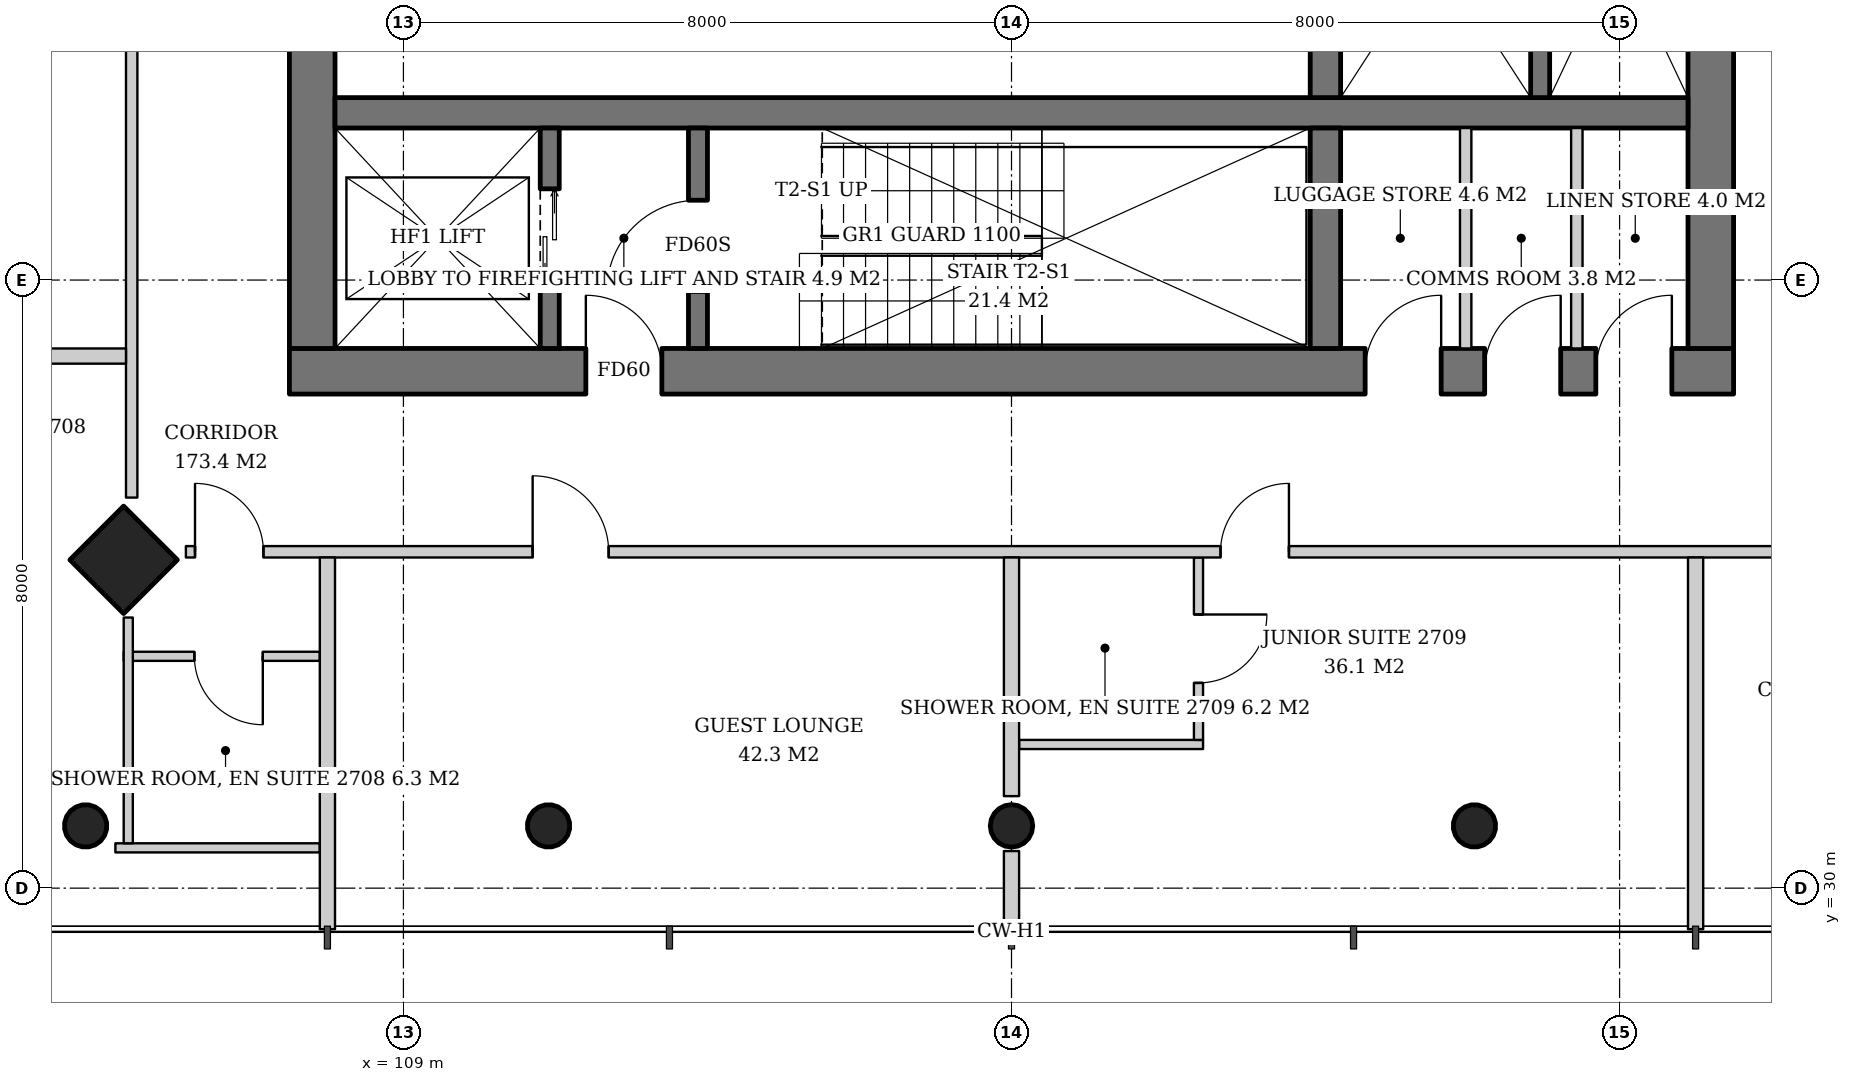
"""IFC4 building model, lengths in metres.
Left out: names, types, materials, properties, quantities, classifications, styles, units other than length and angle.
Written with IfcOpenShell. Run it as: python <this file> out.ifc"""

import sys

from ifc_helpers import new_model, si_unit, direction, frame, frame_2d, origin, origin_2d, place, context, subcontext, project, spatial, rectangle, hollow_circle, extrude, element, fill, save


model = new_model("IFC4")
c1 = context("Model", 3, precision=1e-05, world=origin(), true_north=direction((0.0, 1.0)))
c2 = subcontext(c1, "Body", "Model", "MODEL_VIEW")
j1 = project(units=[si_unit("LENGTHUNIT", "METRE"), si_unit("PLANEANGLEUNIT", "RADIAN")], contexts=[c1])
p1 = place(None, origin())
s1 = spatial("IfcSite", under=j1, at=p1, CompositionType="ELEMENT")
p2 = place(p1, origin())
s2 = spatial("IfcBuilding", under=s1, at=p2, CompositionType="ELEMENT")
p3 = place(p2, frame((0.0, 0.0, 108.4)))
s3 = spatial("IfcBuildingStorey", under=s2, at=p3, CompositionType="ELEMENT", Elevation=108.4)
p4 = place(p3, frame((105.267, 34.267, 0.0), z_axis=(0.043029647111, 0.043029647111, 0.998146732169), x_axis=(-0.707106781187, 0.707106781187, 0.0)))
e1 = element("IfcColumn", 1, at=p4, inside=s3, PredefinedType="COLUMN", context=c2, shape_type="SweptSolid", body=[
    extrude(rectangle(XDim=1.0, YDim=1.0, at=origin_2d()), origin(), (0.0, 0.0, 1.0), 3.807),
])
p5 = place(p3, frame((104.767, 30.767, 0.0), z_axis=(0.043029647111, 0.043029647111, 0.998146732169), x_axis=(-0.707106781187, 0.707106781187, 0.0)))
e2 = element("IfcColumn", 2, at=p5, inside=s3, PredefinedType="COLUMN", context=c2, shape_type="SweptSolid", body=[
    extrude(hollow_circle(Radius=0.28, WallThickness=0.02, at=origin_2d()), origin(), (0.0, 0.0, 1.0), 3.807),
])
p6 = place(p3, frame((110.884, 30.767, 0.0), z_axis=(0.021561848751, 0.043059525333, 0.998839808957), x_axis=(-0.894160516368, 0.44774654769, 0.0)))
e3 = element("IfcColumn", 3, at=p6, inside=s3, PredefinedType="COLUMN", context=c2, shape_type="SweptSolid", body=[
    extrude(hollow_circle(Radius=0.28, WallThickness=0.02, at=origin_2d()), origin(), (0.0, 0.0, 1.0), 3.804),
])
p7 = place(p3, frame((117.0, 30.767, 0.0), z_axis=(0.0, 0.043069538298, 0.999072076915), x_axis=(-1.0, 0.0, 0.0)))
e4 = element("IfcColumn", 4, at=p7, inside=s3, PredefinedType="COLUMN", context=c2, shape_type="SweptSolid", body=[
    extrude(hollow_circle(Radius=0.28, WallThickness=0.02, at=origin_2d()), origin(), (0.0, 0.0, 1.0), 3.803),
])
p8 = place(p3, frame((123.116, 30.767, 0.0), z_axis=(-0.021561848751, 0.043059525333, 0.998839808957), x_axis=(-0.894160516368, -0.44774654769, 0.0)))
e5 = element("IfcColumn", 5, at=p8, inside=s3, PredefinedType="COLUMN", context=c2, shape_type="SweptSolid", body=[
    extrude(hollow_circle(Radius=0.28, WallThickness=0.02, at=origin_2d()), origin(), (0.0, 0.0, 1.0), 3.804),
])
p9 = place(p3, frame((107.5, 36.8, 0.0), z_axis=(0.0, 0.0, 1.0), x_axis=(1.0, 0.0, 0.0)))
e6 = element("IfcWall", 6, at=p9, inside=s3, PredefinedType="SHEAR", context=c2, shape_type="SweptSolid", body=[
    extrude(rectangle(XDim=19.0, YDim=0.6, at=frame_2d((9.5, 0.0))), origin(), (0.0, 0.0, 1.0), 3.8),
])
p10 = place(p9, frame((3.9, 0.0, 0.0)))
e7 = element("IfcOpeningElement", 7, at=p10, cuts=e6, PredefinedType="OPENING", context=c2, shape_type="SweptSolid", body=[
    extrude(rectangle(XDim=1.0, YDim=2.1, at=frame_2d((0.5, 1.05))), frame((0.0, 0.31, 0.0), z_axis=(0.0, -1.0, 0.0), x_axis=(1.0, 0.0, 0.0)), (0.0, 0.0, 1.0), 0.62),
])
p11 = place(p9, frame((14.153, 0.0, 0.0)))
e8 = element("IfcOpeningElement", 8, at=p11, cuts=e6, PredefinedType="OPENING", context=c2, shape_type="SweptSolid", body=[
    extrude(rectangle(XDim=1.0, YDim=2.1, at=frame_2d((0.5, 1.05))), frame((0.0, 0.31, 0.0), z_axis=(0.0, -1.0, 0.0), x_axis=(1.0, 0.0, 0.0)), (0.0, 0.0, 1.0), 0.62),
])
p12 = place(p9, frame((15.725, 0.0, 0.0)))
e9 = element("IfcOpeningElement", 9, at=p12, cuts=e6, PredefinedType="OPENING", context=c2, shape_type="SweptSolid", body=[
    extrude(rectangle(XDim=1.0, YDim=2.1, at=frame_2d((0.5, 1.05))), frame((0.0, 0.31, 0.0), z_axis=(0.0, -1.0, 0.0), x_axis=(1.0, 0.0, 0.0)), (0.0, 0.0, 1.0), 0.62),
])
p13 = place(p9, frame((17.188, 0.0, 0.0)))
e10 = element("IfcOpeningElement", 10, at=p13, cuts=e6, PredefinedType="OPENING", context=c2, shape_type="SweptSolid", body=[
    extrude(rectangle(XDim=1.0, YDim=2.1, at=frame_2d((0.5, 1.05))), frame((0.0, 0.31, 0.0), z_axis=(0.0, -1.0, 0.0), x_axis=(1.0, 0.0, 0.0)), (0.0, 0.0, 1.0), 0.62),
])
p14 = place(p3, frame((107.8, 37.1, 0.0), z_axis=(0.0, 0.0, 1.0), x_axis=(0.0, 1.0, 0.0)))
e11 = element("IfcWall", 11, at=p14, inside=s3, PredefinedType="SHEAR", context=c2, shape_type="SweptSolid", body=[
    extrude(rectangle(XDim=17.8, YDim=0.6, at=frame_2d((8.9, 0.0))), origin(), (0.0, 0.0, 1.0), 3.8),
])
p15 = place(p14, frame((8.0, 0.0, 0.0)))
e12 = element("IfcOpeningElement", 12, at=p15, cuts=e11, PredefinedType="OPENING", context=c2, shape_type="SweptSolid", body=[
    extrude(rectangle(XDim=1.8, YDim=2.4, at=frame_2d((0.9, 1.2))), frame((0.0, 0.31, 0.0), z_axis=(0.0, -1.0, 0.0), x_axis=(1.0, 0.0, 0.0)), (0.0, 0.0, 1.0), 0.62),
])
p16 = place(p3, frame((126.2, 37.1, 0.0), z_axis=(0.0, 0.0, 1.0), x_axis=(0.0, 1.0, 0.0)))
e13 = element("IfcWall", 13, at=p16, inside=s3, PredefinedType="SHEAR", context=c2, shape_type="SweptSolid", body=[
    extrude(rectangle(XDim=17.8, YDim=0.6, at=frame_2d((8.9, 0.0))), origin(), (0.0, 0.0, 1.0), 3.8),
])
p17 = place(p16, frame((8.0, 0.0, 0.0)))
e14 = element("IfcOpeningElement", 14, at=p17, cuts=e13, PredefinedType="OPENING", context=c2, shape_type="SweptSolid", body=[
    extrude(rectangle(XDim=1.8, YDim=2.4, at=frame_2d((0.9, 1.2))), frame((0.0, 0.31, 0.0), z_axis=(0.0, -1.0, 0.0), x_axis=(1.0, 0.0, 0.0)), (0.0, 0.0, 1.0), 0.62),
])
p18 = place(p3, frame((108.1, 40.2, 0.0), z_axis=(0.0, 0.0, 1.0), x_axis=(1.0, 0.0, 0.0)))
e15 = element("IfcWall", 15, at=p18, inside=s3, PredefinedType="SHEAR", context=c2, shape_type="SweptSolid", body=[
    extrude(rectangle(XDim=17.8, YDim=0.4, at=frame_2d((8.9, 0.0))), origin(), (0.0, 0.0, 1.0), 3.8),
])
p19 = place(p3, frame((121.13, 37.1, 0.0), z_axis=(0.0, 0.0, 1.0), x_axis=(0.0, 1.0, 0.0)))
e16 = element("IfcWall", 16, at=p19, inside=s3, PredefinedType="SHEAR", context=c2, shape_type="SweptSolid", body=[
    extrude(rectangle(XDim=2.9, YDim=0.4, at=frame_2d((1.45, 0.0))), origin(), (0.0, 0.0, 1.0), 3.8),
])
p20 = place(p3, frame((121.13, 40.4, 0.0), z_axis=(0.0, 0.0, 1.0), x_axis=(0.0, 1.0, 0.0)))
e17 = element("IfcWall", 17, at=p20, inside=s3, PredefinedType="SHEAR", context=c2, shape_type="SweptSolid", body=[
    extrude(rectangle(XDim=11.2, YDim=0.4, at=frame_2d((5.6, 0.0))), origin(), (0.0, 0.0, 1.0), 3.8),
])
p21 = place(p3, frame((110.925, 37.1, 0.0), z_axis=(0.0, 0.0, 1.0), x_axis=(0.0, 1.0, 0.0)))
e18 = element("IfcWall", 18, at=p21, inside=s3, PredefinedType="SHEAR", context=c2, shape_type="SweptSolid", body=[
    extrude(rectangle(XDim=2.9, YDim=0.25, at=frame_2d((1.45, 0.0))), origin(), (0.0, 0.0, 1.0), 3.8),
])
p22 = place(p21, frame((0.8, 0.0, 0.0)))
e19 = element("IfcOpeningElement", 19, at=p22, cuts=e18, PredefinedType="OPENING", context=c2, shape_type="SweptSolid", body=[
    extrude(rectangle(XDim=1.3, YDim=2.2, at=frame_2d((0.65, 1.1))), frame((0.0, 0.135, 0.0), z_axis=(0.0, -1.0, 0.0), x_axis=(1.0, 0.0, 0.0)), (0.0, 0.0, 1.0), 0.27),
])
p23 = place(p3, frame((112.875, 37.1, 0.0), z_axis=(0.0, 0.0, 1.0), x_axis=(0.0, 1.0, 0.0)))
e20 = element("IfcWall", 20, at=p23, inside=s3, PredefinedType="SHEAR", context=c2, shape_type="SweptSolid", body=[
    extrude(rectangle(XDim=2.9, YDim=0.25, at=frame_2d((1.45, 0.0))), origin(), (0.0, 0.0, 1.0), 3.8),
])
p24 = place(p23, frame((0.75, 0.0, 0.0)))
e21 = element("IfcOpeningElement", 21, at=p24, cuts=e20, PredefinedType="OPENING", context=c2, shape_type="SweptSolid", body=[
    extrude(rectangle(XDim=1.2, YDim=2.1, at=frame_2d((0.6, 1.05))), frame((0.0, 0.135, 0.0), z_axis=(0.0, -1.0, 0.0), x_axis=(1.0, 0.0, 0.0)), (0.0, 0.0, 1.0), 0.27),
])
p25 = place(p3, frame((123.955, 44.25, 0.0), z_axis=(0.0, 0.0, 1.0), x_axis=(0.0, -1.0, 0.0)))
e22 = element("IfcWall", 22, at=p25, inside=s3, PredefinedType="SHEAR", context=c2, shape_type="SweptSolid", body=[
    extrude(rectangle(XDim=3.85, YDim=0.25, at=frame_2d((1.925, 0.0))), origin(), (0.0, 0.0, 1.0), 3.8),
])
for number, where, z_axis, x_axis in (
    (23, (122.975, 37.1, 0.0), (0.0, 0.0, 1.0), (0.0, 1.0, 0.0)),
    (24, (124.438, 37.1, 0.0), (0.0, 0.0, 1.0), (0.0, 1.0, 0.0)),
):
    element("IfcWall", number, at=place(p3, frame(where, z_axis=z_axis, x_axis=x_axis)), inside=s3, PredefinedType="SOLIDWALL", context=c2, shape_type="SweptSolid", body=[
        extrude(rectangle(XDim=2.9, YDim=0.15, at=frame_2d((1.45, 0.0))), origin(), (0.0, 0.0, 1.0), 3.6),
    ])
p26 = place(p3, frame((105.425, 56.862, 0.0), z_axis=(0.0, 0.0, 1.0), x_axis=(0.0, -1.0, 0.0)))
e25 = element("IfcWall", 25, at=p26, inside=s3, PredefinedType="PARTITIONING", context=c2, shape_type="SweptSolid", body=[
    extrude(rectangle(XDim=21.724, YDim=0.15, at=frame_2d((10.862, 0.0))), origin(), (0.0, 0.0, 1.0), 2.9),
])
p27 = place(p26, frame((0.12, 0.0, 0.0)))
e26 = element("IfcOpeningElement", 26, at=p27, cuts=e25, PredefinedType="OPENING", context=c2, shape_type="SweptSolid", body=[
    extrude(rectangle(XDim=0.9, YDim=2.1, at=frame_2d((0.45, 1.05))), frame((0.0, 0.085, 0.0), z_axis=(0.0, -1.0, 0.0), x_axis=(1.0, 0.0, 0.0)), (0.0, 0.0, 1.0), 0.17),
])
p28 = place(p26, frame((4.612, 0.0, 0.0)))
e27 = element("IfcOpeningElement", 27, at=p28, cuts=e25, PredefinedType="OPENING", context=c2, shape_type="SweptSolid", body=[
    extrude(rectangle(XDim=0.9, YDim=2.1, at=frame_2d((0.45, 1.05))), frame((0.0, 0.085, 0.0), z_axis=(0.0, -1.0, 0.0), x_axis=(1.0, 0.0, 0.0)), (0.0, 0.0, 1.0), 0.17),
])
p29 = place(p26, frame((13.612, 0.0, 0.0)))
e28 = element("IfcOpeningElement", 28, at=p29, cuts=e25, PredefinedType="OPENING", context=c2, shape_type="SweptSolid", body=[
    extrude(rectangle(XDim=0.9, YDim=2.1, at=frame_2d((0.45, 1.05))), frame((0.0, 0.085, 0.0), z_axis=(0.0, -1.0, 0.0), x_axis=(1.0, 0.0, 0.0)), (0.0, 0.0, 1.0), 0.17),
])
p30 = place(p3, frame((105.35, 37.0, 0.0), z_axis=(0.0, 0.0, 1.0), x_axis=(-1.0, 0.0, 0.0)))
e29 = element("IfcWall", 29, at=p30, inside=s3, PredefinedType="PARTITIONING", context=c2, shape_type="SweptSolid", body=[
    extrude(rectangle(XDim=4.89, YDim=0.2, at=frame_2d((2.445, 0.0))), origin(), (0.0, 0.0, 1.0), 3.2),
])
p31 = place(p3, frame((107.9, 33.05, 0.0), z_axis=(0.0, 0.0, 1.0), x_axis=(-1.0, 0.0, 0.0)))
e30 = element("IfcWall", 30, at=p31, inside=s3, PredefinedType="PARTITIONING", context=c2, shape_type="SweptSolid", body=[
    extrude(rectangle(XDim=2.58, YDim=0.12, at=frame_2d((1.29, 0.0))), origin(), (0.0, 0.0, 1.0), 2.9),
])
p32 = place(p31, frame((0.75, 0.0, 0.0)))
e31 = element("IfcOpeningElement", 31, at=p32, cuts=e30, PredefinedType="OPENING", context=c2, shape_type="SweptSolid", body=[
    extrude(rectangle(XDim=0.9, YDim=2.1, at=frame_2d((0.45, 1.05))), frame((0.0, 0.07, 0.0), z_axis=(0.0, -1.0, 0.0), x_axis=(1.0, 0.0, 0.0)), (0.0, 0.0, 1.0), 0.14),
])
p33 = place(p3, frame((107.9, 30.53, 0.0), z_axis=(0.0, 0.0, 1.0), x_axis=(-1.0, 0.0, 0.0)))
e32 = element("IfcWall", 32, at=p33, inside=s3, PredefinedType="PARTITIONING", context=c2, shape_type="SweptSolid", body=[
    extrude(rectangle(XDim=2.689, YDim=0.12, at=frame_2d((1.345, 0.0))), origin(), (0.0, 0.0, 1.0), 3.6),
])
p34 = place(p3, frame((105.38, 33.56, 0.0), z_axis=(0.0, 0.0, 1.0), x_axis=(0.0, -1.0, 0.0)))
e33 = element("IfcWall", 33, at=p34, inside=s3, PredefinedType="PARTITIONING", context=c2, shape_type="SweptSolid", body=[
    extrude(rectangle(XDim=2.97, YDim=0.12, at=frame_2d((1.485, 0.0))), origin(), (0.0, 0.0, 1.0), 3.2),
])
p35 = place(p3, frame((117.1, 31.89, 0.0), z_axis=(0.0, 0.0, 1.0), x_axis=(1.0, 0.0, 0.0)))
e34 = element("IfcWall", 34, at=p35, inside=s3, PredefinedType="PARTITIONING", context=c2, shape_type="SweptSolid", body=[
    extrude(rectangle(XDim=2.42, YDim=0.12, at=frame_2d((1.21, 0.0))), origin(), (0.0, 0.0, 1.0), 3.6),
])
p36 = place(p3, frame((119.46, 34.35, 0.0), z_axis=(0.0, 0.0, 1.0), x_axis=(0.0, -1.0, 0.0)))
e35 = element("IfcWall", 35, at=p36, inside=s3, PredefinedType="PARTITIONING", context=c2, shape_type="SweptSolid", body=[
    extrude(rectangle(XDim=2.4, YDim=0.12, at=frame_2d((1.2, 0.0))), origin(), (0.0, 0.0, 1.0), 3.6),
])
p37 = place(p36, frame((0.75, 0.0, 0.0)))
e36 = element("IfcOpeningElement", 36, at=p37, cuts=e35, PredefinedType="OPENING", context=c2, shape_type="SweptSolid", body=[
    extrude(rectangle(XDim=0.9, YDim=2.1, at=frame_2d((0.45, 1.05))), frame((0.0, 0.07, 0.0), z_axis=(0.0, -1.0, 0.0), x_axis=(1.0, 0.0, 0.0)), (0.0, 0.0, 1.0), 0.14),
])
p38 = place(p3, frame((106.138, 34.425, 0.0), z_axis=(0.0, 0.0, 1.0), x_axis=(1.0, 0.0, 0.0)))
e37 = element("IfcWall", 37, at=p38, inside=s3, PredefinedType="PARTITIONING", context=c2, shape_type="SweptSolid", body=[
    extrude(rectangle(XDim=21.724, YDim=0.15, at=frame_2d((10.862, 0.0))), origin(), (0.0, 0.0, 1.0), 2.9),
])
p39 = place(p38, frame((0.12, 0.0, 0.0)))
e38 = element("IfcOpeningElement", 38, at=p39, cuts=e37, PredefinedType="OPENING", context=c2, shape_type="SweptSolid", body=[
    extrude(rectangle(XDim=0.9, YDim=2.1, at=frame_2d((0.45, 1.05))), frame((0.0, 0.085, 0.0), z_axis=(0.0, -1.0, 0.0), x_axis=(1.0, 0.0, 0.0)), (0.0, 0.0, 1.0), 0.17),
])
p40 = place(p38, frame((4.562, 0.0, 0.0)))
e39 = element("IfcOpeningElement", 39, at=p40, cuts=e37, PredefinedType="OPENING", context=c2, shape_type="SweptSolid", body=[
    extrude(rectangle(XDim=1.0, YDim=2.1, at=frame_2d((0.5, 1.05))), frame((0.0, 0.085, 0.0), z_axis=(0.0, -1.0, 0.0), x_axis=(1.0, 0.0, 0.0)), (0.0, 0.0, 1.0), 0.17),
])
p41 = place(p38, frame((13.612, 0.0, 0.0)))
e40 = element("IfcOpeningElement", 40, at=p41, cuts=e37, PredefinedType="OPENING", context=c2, shape_type="SweptSolid", body=[
    extrude(rectangle(XDim=0.9, YDim=2.1, at=frame_2d((0.45, 1.05))), frame((0.0, 0.085, 0.0), z_axis=(0.0, -1.0, 0.0), x_axis=(1.0, 0.0, 0.0)), (0.0, 0.0, 1.0), 0.17),
])
p42 = place(p3, frame((108.0, 34.35, 0.0), z_axis=(0.0, 0.0, 1.0), x_axis=(0.0, -1.0, 0.0)))
e41 = element("IfcWall", 41, at=p42, inside=s3, PredefinedType="PARTITIONING", context=c2, shape_type="SweptSolid", body=[
    extrude(rectangle(XDim=4.89, YDim=0.2, at=frame_2d((2.445, 0.0))), origin(), (0.0, 0.0, 1.0), 2.9),
])
p43 = place(p3, frame((117.0, 34.35, 0.0), z_axis=(0.0, 0.0, 1.0), x_axis=(0.0, -1.0, 0.0)))
e42 = element("IfcWall", 42, at=p43, inside=s3, PredefinedType="PARTITIONING", context=c2, shape_type="SweptSolid", body=[
    extrude(rectangle(XDim=3.14, YDim=0.2, at=frame_2d((1.57, 0.0))), origin(), (0.0, 0.0, 1.0), 3.6),
])
p44 = place(p3, frame((117.0, 30.488, 0.0), z_axis=(0.0, 0.0, 1.0), x_axis=(0.0, -1.0, 0.0)))
e43 = element("IfcWall", 43, at=p44, inside=s3, PredefinedType="PARTITIONING", context=c2, shape_type="SweptSolid", body=[
    extrude(rectangle(XDim=1.028, YDim=0.2, at=frame_2d((0.514, 0.0))), origin(), (0.0, 0.0, 1.0), 3.6),
])
p45 = place(p3, frame((126.0, 34.35, 0.0), z_axis=(0.0, 0.0, 1.0), x_axis=(0.0, -1.0, 0.0)))
e44 = element("IfcWall", 44, at=p45, inside=s3, PredefinedType="PARTITIONING", context=c2, shape_type="SweptSolid", body=[
    extrude(rectangle(XDim=4.89, YDim=0.2, at=frame_2d((2.445, 0.0))), origin(), (0.0, 0.0, 1.0), 3.2),
])
p46 = place(p22, origin())
e45 = element("IfcDoor", 45, at=p46, inside=s3, OperationType="DOUBLE_DOOR_SLIDING", PredefinedType="DOOR", context=c2, shape_type="SweptSolid", body=[
    extrude(rectangle(XDim=1.3, YDim=2.2, at=frame_2d((0.65, 1.1))), frame((0.0, 0.025, 0.0), z_axis=(0.0, -1.0, 0.0), x_axis=(1.0, 0.0, 0.0)), (0.0, 0.0, 1.0), 0.05),
])
fill(e19, e45)
p47 = place(p24, origin())
e46 = element("IfcDoor", 46, at=p47, inside=s3, OperationType="SINGLE_SWING_LEFT", PredefinedType="DOOR", context=c2, shape_type="SweptSolid", body=[
    extrude(rectangle(XDim=1.2, YDim=2.1, at=frame_2d((0.6, 1.05))), frame((0.0, 0.025, 0.0), z_axis=(0.0, -1.0, 0.0), x_axis=(1.0, 0.0, 0.0)), (0.0, 0.0, 1.0), 0.05),
])
fill(e21, e46)
p48 = place(p10, origin())
e47 = element("IfcDoor", 47, at=p48, inside=s3, OperationType="SINGLE_SWING_LEFT", PredefinedType="DOOR", context=c2, shape_type="SweptSolid", body=[
    extrude(rectangle(XDim=1.0, YDim=2.1, at=frame_2d((0.5, 1.05))), frame((0.0, 0.025, 0.0), z_axis=(0.0, -1.0, 0.0), x_axis=(1.0, 0.0, 0.0)), (0.0, 0.0, 1.0), 0.05),
])
fill(e7, e47)
p49 = place(p11, origin())
e48 = element("IfcDoor", 48, at=p49, inside=s3, OperationType="SINGLE_SWING_RIGHT", PredefinedType="DOOR", context=c2, shape_type="SweptSolid", body=[
    extrude(rectangle(XDim=1.0, YDim=2.1, at=frame_2d((0.5, 1.05))), frame((0.0, 0.29, 0.0), z_axis=(0.0, -1.0, 0.0), x_axis=(1.0, 0.0, 0.0)), (0.0, 0.0, 1.0), 0.05),
])
fill(e8, e48)
p50 = place(p12, origin())
e49 = element("IfcDoor", 49, at=p50, inside=s3, OperationType="SINGLE_SWING_RIGHT", PredefinedType="DOOR", context=c2, shape_type="SweptSolid", body=[
    extrude(rectangle(XDim=1.0, YDim=2.1, at=frame_2d((0.5, 1.05))), frame((0.0, 0.29, 0.0), z_axis=(0.0, -1.0, 0.0), x_axis=(1.0, 0.0, 0.0)), (0.0, 0.0, 1.0), 0.05),
])
fill(e9, e49)
p51 = place(p13, origin())
e50 = element("IfcDoor", 50, at=p51, inside=s3, OperationType="SINGLE_SWING_RIGHT", PredefinedType="DOOR", context=c2, shape_type="SweptSolid", body=[
    extrude(rectangle(XDim=1.0, YDim=2.1, at=frame_2d((0.5, 1.05))), frame((0.0, 0.29, 0.0), z_axis=(0.0, -1.0, 0.0), x_axis=(1.0, 0.0, 0.0)), (0.0, 0.0, 1.0), 0.05),
])
fill(e10, e50)
p52 = place(p32, origin())
e51 = element("IfcDoor", 51, at=p52, inside=s3, OperationType="SINGLE_SWING_LEFT", PredefinedType="DOOR", context=c2, shape_type="SweptSolid", body=[
    extrude(rectangle(XDim=0.9, YDim=2.1, at=frame_2d((0.45, 1.05))), frame((0.0, 0.025, 0.0), z_axis=(0.0, -1.0, 0.0), x_axis=(1.0, 0.0, 0.0)), (0.0, 0.0, 1.0), 0.05),
])
fill(e31, e51)
p53 = place(p37, origin())
e52 = element("IfcDoor", 52, at=p53, inside=s3, OperationType="SINGLE_SWING_LEFT", PredefinedType="DOOR", context=c2, shape_type="SweptSolid", body=[
    extrude(rectangle(XDim=0.9, YDim=2.1, at=frame_2d((0.45, 1.05))), frame((0.0, 0.025, 0.0), z_axis=(0.0, -1.0, 0.0), x_axis=(1.0, 0.0, 0.0)), (0.0, 0.0, 1.0), 0.05),
])
fill(e36, e52)
p54 = place(p39, origin())
e53 = element("IfcDoor", 53, at=p54, inside=s3, OperationType="SINGLE_SWING_LEFT", PredefinedType="DOOR", context=c2, shape_type="SweptSolid", body=[
    extrude(rectangle(XDim=0.9, YDim=2.1, at=frame_2d((0.45, 1.05))), frame((0.0, 0.025, 0.0), z_axis=(0.0, -1.0, 0.0), x_axis=(1.0, 0.0, 0.0)), (0.0, 0.0, 1.0), 0.05),
])
fill(e38, e53)
p55 = place(p40, origin())
e54 = element("IfcDoor", 54, at=p55, inside=s3, OperationType="SINGLE_SWING_LEFT", PredefinedType="DOOR", context=c2, shape_type="SweptSolid", body=[
    extrude(rectangle(XDim=1.0, YDim=2.1, at=frame_2d((0.5, 1.05))), frame((0.0, 0.025, 0.0), z_axis=(0.0, -1.0, 0.0), x_axis=(1.0, 0.0, 0.0)), (0.0, 0.0, 1.0), 0.05),
])
fill(e39, e54)
p56 = place(p41, origin())
e55 = element("IfcDoor", 55, at=p56, inside=s3, OperationType="SINGLE_SWING_RIGHT", PredefinedType="DOOR", context=c2, shape_type="SweptSolid", body=[
    extrude(rectangle(XDim=0.9, YDim=2.1, at=frame_2d((0.45, 1.05))), frame((0.0, 0.025, 0.0), z_axis=(0.0, -1.0, 0.0), x_axis=(1.0, 0.0, 0.0)), (0.0, 0.0, 1.0), 0.05),
])
fill(e40, e55)
save(model, sys.argv[1])
